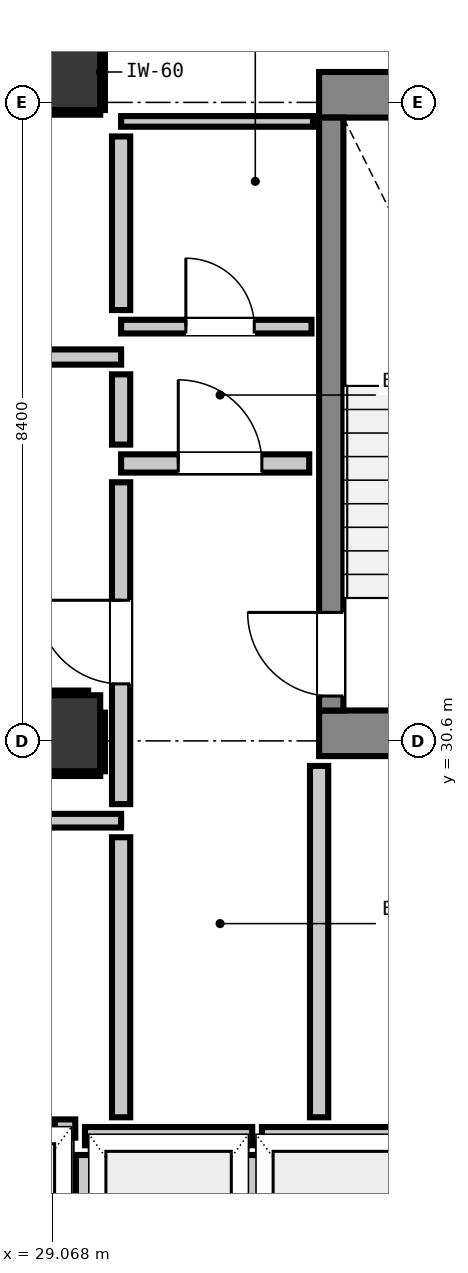
"""IFC4 building model, lengths in metres.
Left out: names, types, materials, properties, quantities, classifications, styles, units other than length and angle.
Written with IfcOpenShell. Run it as: python <this file> out.ifc"""

import sys

from ifc_helpers import new_model, si_unit, direction, frame, frame_2d, origin, origin_2d, place, context, subcontext, project, spatial, rectangle, extrude, element, fill, save


model = new_model("IFC4")
c1 = context("Model", 3, precision=1e-05, world=origin(), true_north=direction((0.0, 1.0)))
c2 = subcontext(c1, "Body", "Model", "MODEL_VIEW")
j1 = project(units=[si_unit("LENGTHUNIT", "METRE"), si_unit("PLANEANGLEUNIT", "RADIAN")], contexts=[c1])
p1 = place(None, origin())
s1 = spatial("IfcSite", under=j1, at=p1, CompositionType="ELEMENT")
p2 = place(p1, origin())
s2 = spatial("IfcBuilding", under=s1, at=p2, CompositionType="ELEMENT")
p3 = place(p2, frame((0.0, 0.0, 65.16)))
s3 = spatial("IfcBuildingStorey", under=s2, at=p3, CompositionType="ELEMENT", Elevation=65.16)
p4 = place(p3, frame((29.2, 39.4, 0.0), z_axis=(0.0, 0.0, 1.0), x_axis=(1.0, 0.0, 0.0)))
e1 = element("IfcColumn", 1, at=p4, inside=s3, PredefinedType="COLUMN", context=c2, shape_type="SweptSolid", body=[
    extrude(rectangle(XDim=1.0, YDim=1.0, at=origin_2d()), origin(), (0.0, 0.0, 1.0), 3.32),
])
p5 = place(p3, frame((32.58, 39.1, 0.0), z_axis=(0.0, 0.0, 1.0), x_axis=(1.0, 0.0, 0.0)))
e2 = element("IfcWall", 2, at=p5, inside=s3, PredefinedType="SHEAR", context=c2, shape_type="SweptSolid", body=[
    extrude(rectangle(XDim=4.08, YDim=0.6, at=frame_2d((2.04, 0.0))), origin(), (0.0, 0.0, 1.0), 3.32),
])
p6 = place(p3, frame((32.58, 30.7, 0.0), z_axis=(0.0, 0.0, 1.0), x_axis=(1.0, 0.0, 0.0)))
e3 = element("IfcWall", 3, at=p6, inside=s3, PredefinedType="SHEAR", context=c2, shape_type="SweptSolid", body=[
    extrude(rectangle(XDim=3.415, YDim=0.6, at=frame_2d((1.708, 0.0))), origin(), (0.0, 0.0, 1.0), 3.32),
])
p7 = place(p3, frame((32.74, 31.0, 0.0), z_axis=(0.0, 0.0, 1.0), x_axis=(0.0, 1.0, 0.0)))
e4 = element("IfcWall", 4, at=p7, inside=s3, PredefinedType="SHEAR", context=c2, shape_type="SweptSolid", body=[
    extrude(rectangle(XDim=7.8, YDim=0.32, at=frame_2d((3.9, 0.0))), origin(), (0.0, 0.0, 1.0), 3.32),
])
p8 = place(p7, frame((0.19, 0.0, 0.0)))
e5 = element("IfcOpeningElement", 5, at=p8, cuts=e4, PredefinedType="OPENING", context=c2, shape_type="SweptSolid", body=[
    extrude(rectangle(XDim=1.1, YDim=2.15, at=frame_2d((0.55, 1.075))), frame((0.0, 0.17, 0.0), z_axis=(0.0, -1.0, 0.0), x_axis=(1.0, 0.0, 0.0)), (0.0, 0.0, 1.0), 0.34),
])
p9 = place(p3, frame((29.2, 30.7, 0.0), z_axis=(0.0, 0.0, 1.0), x_axis=(1.0, 0.0, 0.0)))
e6 = element("IfcColumn", 6, at=p9, inside=s3, PredefinedType="COLUMN", context=c2, shape_type="SweptSolid", body=[
    extrude(rectangle(XDim=1.0, YDim=1.0, at=origin_2d()), origin(), (0.0, 0.0, 1.0), 3.32),
])
p10 = place(p3, frame((29.5, 25.4, 0.0), z_axis=(0.0, 0.0, 1.0), x_axis=(1.0, 0.0, 0.0)))
e7 = element("IfcWall", 7, at=p10, inside=s3, PredefinedType="PARTITIONING", context=c2, shape_type="SweptSolid", body=[
    extrude(rectangle(XDim=2.2, YDim=0.24, at=frame_2d((1.1, 0.0))), origin(), (0.0, 0.0, 1.0), 3.06),
])
p11 = place(p3, frame((29.5, 22.632, 0.0), z_axis=(0.0, 0.0, 1.0), x_axis=(0.0, 1.0, 0.0)))
e8 = element("IfcWall", 8, at=p11, inside=s3, PredefinedType="PARTITIONING", context=c2, shape_type="SweptSolid", body=[
    extrude(rectangle(XDim=2.52, YDim=0.24, at=frame_2d((1.26, 0.0))), origin(), (0.0, 0.0, 1.0), 2.295),
])
p12 = place(p3, frame((31.7, 22.73, 0.0), z_axis=(0.0, 0.0, 1.0), x_axis=(0.0, 1.0, 0.0)))
e9 = element("IfcWall", 9, at=p12, inside=s3, PredefinedType="PARTITIONING", context=c2, shape_type="SweptSolid", body=[
    extrude(rectangle(XDim=2.422, YDim=0.24, at=frame_2d((1.211, 0.0))), origin(), (0.0, 0.0, 1.0), 3.06),
])
p13 = place(p3, frame((31.828, 25.4, 0.0), z_axis=(0.0, 0.0, 1.0), x_axis=(1.0, 0.0, 0.0)))
e10 = element("IfcWall", 10, at=p13, inside=s3, PredefinedType="PARTITIONING", context=c2, shape_type="SweptSolid", body=[
    extrude(rectangle(XDim=2.072, YDim=0.24, at=frame_2d((1.036, 0.0))), origin(), (0.0, 0.0, 1.0), 3.06),
])
p14 = place(p3, frame((29.103, 25.5, 0.0), z_axis=(0.0, 0.0, 1.0), x_axis=(1.0, 0.0, 0.0)))
e11 = element("IfcWall", 11, at=p14, inside=s3, PredefinedType="PARTITIONING", context=c2, shape_type="SweptSolid", body=[
    extrude(rectangle(XDim=0.269, YDim=0.24, at=frame_2d((0.135, 0.0))), origin(), (0.0, 0.0, 1.0), 3.06),
])
p15 = place(p3, frame((29.975, 34.25, 0.0), z_axis=(0.0, 0.0, 1.0), x_axis=(1.0, 0.0, 0.0)))
e12 = element("IfcWall", 12, at=p15, inside=s3, PredefinedType="PARTITIONING", context=c2, shape_type="SweptSolid", body=[
    extrude(rectangle(XDim=2.475, YDim=0.24, at=frame_2d((1.237, 0.0))), origin(), (0.0, 0.0, 1.0), 3.06),
])
p16 = place(p15, frame((0.752, 0.0, 0.0)))
e13 = element("IfcOpeningElement", 13, at=p16, cuts=e12, PredefinedType="OPENING", context=c2, shape_type="SweptSolid", body=[
    extrude(rectangle(XDim=1.1, YDim=2.15, at=frame_2d((0.55, 1.075))), frame((0.0, 0.13, 0.0), z_axis=(0.0, -1.0, 0.0), x_axis=(1.0, 0.0, 0.0)), (0.0, 0.0, 1.0), 0.26),
])
p17 = place(p3, frame((28.604, 35.65, 0.0), z_axis=(0.0, 0.0, 1.0), x_axis=(1.0, 0.0, 0.0)))
e14 = element("IfcWall", 14, at=p17, inside=s3, PredefinedType="PARTITIONING", context=c2, shape_type="SweptSolid", body=[
    extrude(rectangle(XDim=1.371, YDim=0.2, at=frame_2d((0.686, 0.0))), origin(), (0.0, 0.0, 1.0), 3.06),
])
p18 = place(p3, frame((20.65, 29.55, 0.0), z_axis=(0.0, 0.0, 1.0), x_axis=(1.0, 0.0, 0.0)))
e15 = element("IfcWall", 15, at=p18, inside=s3, PredefinedType="PARTITIONING", context=c2, shape_type="SweptSolid", body=[
    extrude(rectangle(XDim=9.325, YDim=0.18, at=frame_2d((4.663, 0.0))), origin(), (0.0, 0.0, 1.0), 3.06),
])
p19 = place(p3, frame((29.975, 36.05, 0.0), z_axis=(0.0, 0.0, 1.0), x_axis=(1.0, 0.0, 0.0)))
e16 = element("IfcWall", 16, at=p19, inside=s3, PredefinedType="PARTITIONING", context=c2, shape_type="SweptSolid", body=[
    extrude(rectangle(XDim=2.505, YDim=0.18, at=frame_2d((1.252, 0.0))), origin(), (0.0, 0.0, 1.0), 3.06),
])
p20 = place(p19, frame((0.852, 0.0, 0.0)))
e17 = element("IfcOpeningElement", 17, at=p20, cuts=e16, PredefinedType="OPENING", context=c2, shape_type="SweptSolid", body=[
    extrude(rectangle(XDim=0.9, YDim=2.1, at=frame_2d((0.45, 1.05))), frame((0.0, 0.1, 0.0), z_axis=(0.0, -1.0, 0.0), x_axis=(1.0, 0.0, 0.0)), (0.0, 0.0, 1.0), 0.2),
])
p21 = place(p3, frame((29.975, 38.75, 0.0), z_axis=(0.0, 0.0, 1.0), x_axis=(1.0, 0.0, 0.0)))
e18 = element("IfcWall", 18, at=p21, inside=s3, PredefinedType="PARTITIONING", context=c2, shape_type="SweptSolid", body=[
    extrude(rectangle(XDim=2.525, YDim=0.14, at=frame_2d((1.262, 0.0))), origin(), (0.0, 0.0, 1.0), 3.06),
])
p22 = place(p3, frame((29.975, 25.648, 0.0), z_axis=(0.0, 0.0, 1.0), x_axis=(0.0, 1.0, 0.0)))
e19 = element("IfcWall", 19, at=p22, inside=s3, PredefinedType="PARTITIONING", context=c2, shape_type="SweptSolid", body=[
    extrude(rectangle(XDim=3.684, YDim=0.24, at=frame_2d((1.842, 0.0))), origin(), (0.0, 0.0, 1.0), 3.06),
])
p23 = place(p3, frame((29.975, 29.768, 0.0), z_axis=(0.0, 0.0, 1.0), x_axis=(0.0, 1.0, 0.0)))
e20 = element("IfcWall", 20, at=p23, inside=s3, PredefinedType="PARTITIONING", context=c2, shape_type="SweptSolid", body=[
    extrude(rectangle(XDim=4.234, YDim=0.24, at=frame_2d((2.117, 0.0))), origin(), (0.0, 0.0, 1.0), 3.06),
])
p24 = place(p23, frame((1.582, 0.0, 0.0)))
e21 = element("IfcOpeningElement", 21, at=p24, cuts=e20, PredefinedType="OPENING", context=c2, shape_type="SweptSolid", body=[
    extrude(rectangle(XDim=1.1, YDim=2.15, at=frame_2d((0.55, 1.075))), frame((0.0, 0.13, 0.0), z_axis=(0.0, -1.0, 0.0), x_axis=(1.0, 0.0, 0.0)), (0.0, 0.0, 1.0), 0.26),
])
p25 = place(p3, frame((29.975, 34.498, 0.0), z_axis=(0.0, 0.0, 1.0), x_axis=(0.0, 1.0, 0.0)))
e22 = element("IfcWall", 22, at=p25, inside=s3, PredefinedType="PARTITIONING", context=c2, shape_type="SweptSolid", body=[
    extrude(rectangle(XDim=0.924, YDim=0.24, at=frame_2d((0.462, 0.0))), origin(), (0.0, 0.0, 1.0), 3.06),
])
p26 = place(p3, frame((29.975, 36.268, 0.0), z_axis=(0.0, 0.0, 1.0), x_axis=(0.0, 1.0, 0.0)))
e23 = element("IfcWall", 23, at=p26, inside=s3, PredefinedType="PARTITIONING", context=c2, shape_type="SweptSolid", body=[
    extrude(rectangle(XDim=2.284, YDim=0.24, at=frame_2d((1.142, 0.0))), origin(), (0.0, 0.0, 1.0), 3.06),
])
p27 = place(p3, frame((32.58, 25.648, 0.0), z_axis=(0.0, 0.0, 1.0), x_axis=(0.0, 1.0, 0.0)))
e24 = element("IfcWall", 24, at=p27, inside=s3, PredefinedType="PARTITIONING", context=c2, shape_type="SweptSolid", body=[
    extrude(rectangle(XDim=4.622, YDim=0.24, at=frame_2d((2.311, 0.0))), origin(), (0.0, 0.0, 1.0), 3.06),
])
p28 = place(p3, frame((28.71, 38.868, 0.0), z_axis=(0.0, 0.0, 1.0), x_axis=(1.0, 0.0, 0.0)))
e25 = element("IfcWall", 25, at=p28, inside=s3, PredefinedType="PARTITIONING", context=c2, shape_type="SweptSolid", body=[
    extrude(rectangle(XDim=0.99, YDim=0.06, at=frame_2d((0.495, 0.0))), origin(), (0.0, 0.0, 1.0), 1.45),
])
for number, where, z_axis, x_axis in (
    (26, (29.732, 38.9, 0.0), (0.0, 0.0, 1.0), (0.0, 1.0, 0.0)),
    (27, (28.7, 30.168, 0.0), (0.0, 0.0, 1.0), (1.0, 0.0, 0.0)),
):
    element("IfcWall", number, at=place(p3, frame(where, z_axis=z_axis, x_axis=x_axis)), inside=s3, PredefinedType="PARTITIONING", context=c2, shape_type="SweptSolid", body=[
        extrude(rectangle(XDim=1.0, YDim=0.06, at=frame_2d((0.5, 0.0))), origin(), (0.0, 0.0, 1.0), 1.45),
    ])
p29 = place(p3, frame((28.7, 31.232, 0.0), z_axis=(0.0, 0.0, 1.0), x_axis=(1.0, 0.0, 0.0)))
e28 = element("IfcWall", 28, at=p29, inside=s3, PredefinedType="PARTITIONING", context=c2, shape_type="SweptSolid", body=[
    extrude(rectangle(XDim=0.841, YDim=0.06, at=frame_2d((0.42, 0.0))), origin(), (0.0, 0.0, 1.0), 1.45),
])
p30 = place(p3, frame((29.732, 30.2, 0.0), z_axis=(0.0, 0.0, 1.0), x_axis=(0.0, 1.0, 0.0)))
e29 = element("IfcWall", 29, at=p30, inside=s3, PredefinedType="PARTITIONING", context=c2, shape_type="SweptSolid", body=[
    extrude(rectangle(XDim=0.772, YDim=0.06, at=frame_2d((0.386, 0.0))), origin(), (0.0, 0.0, 1.0), 1.45),
])
p31 = place(p8, origin())
e30 = element("IfcDoor", 30, at=p31, inside=s3, OperationType="SINGLE_SWING_RIGHT", PredefinedType="DOOR", context=c2, shape_type="SweptSolid", body=[
    extrude(rectangle(XDim=1.1, YDim=2.15, at=frame_2d((0.55, 1.075))), frame((0.0, 0.025, 0.0), z_axis=(0.0, -1.0, 0.0), x_axis=(1.0, 0.0, 0.0)), (0.0, 0.0, 1.0), 0.05),
])
fill(e5, e30)
p32 = place(p24, origin())
e31 = element("IfcDoor", 31, at=p32, inside=s3, OperationType="SINGLE_SWING_RIGHT", PredefinedType="DOOR", context=c2, shape_type="SweptSolid", body=[
    extrude(rectangle(XDim=1.1, YDim=2.15, at=frame_2d((0.55, 1.075))), frame((0.0, 0.025, 0.0), z_axis=(0.0, -1.0, 0.0), x_axis=(1.0, 0.0, 0.0)), (0.0, 0.0, 1.0), 0.05),
])
fill(e21, e31)
p33 = place(p16, origin())
e32 = element("IfcDoor", 32, at=p33, inside=s3, OperationType="SINGLE_SWING_LEFT", PredefinedType="DOOR", context=c2, shape_type="SweptSolid", body=[
    extrude(rectangle(XDim=1.1, YDim=2.15, at=frame_2d((0.55, 1.075))), frame((0.0, 0.025, 0.0), z_axis=(0.0, -1.0, 0.0), x_axis=(1.0, 0.0, 0.0)), (0.0, 0.0, 1.0), 0.05),
])
fill(e13, e32)
p34 = place(p20, origin())
e33 = element("IfcDoor", 33, at=p34, inside=s3, OperationType="SINGLE_SWING_LEFT", PredefinedType="DOOR", context=c2, shape_type="SweptSolid", body=[
    extrude(rectangle(XDim=0.9, YDim=2.1, at=frame_2d((0.45, 1.05))), frame((0.0, 0.025, 0.0), z_axis=(0.0, -1.0, 0.0), x_axis=(1.0, 0.0, 0.0)), (0.0, 0.0, 1.0), 0.05),
])
fill(e17, e33)
save(model, sys.argv[1])
